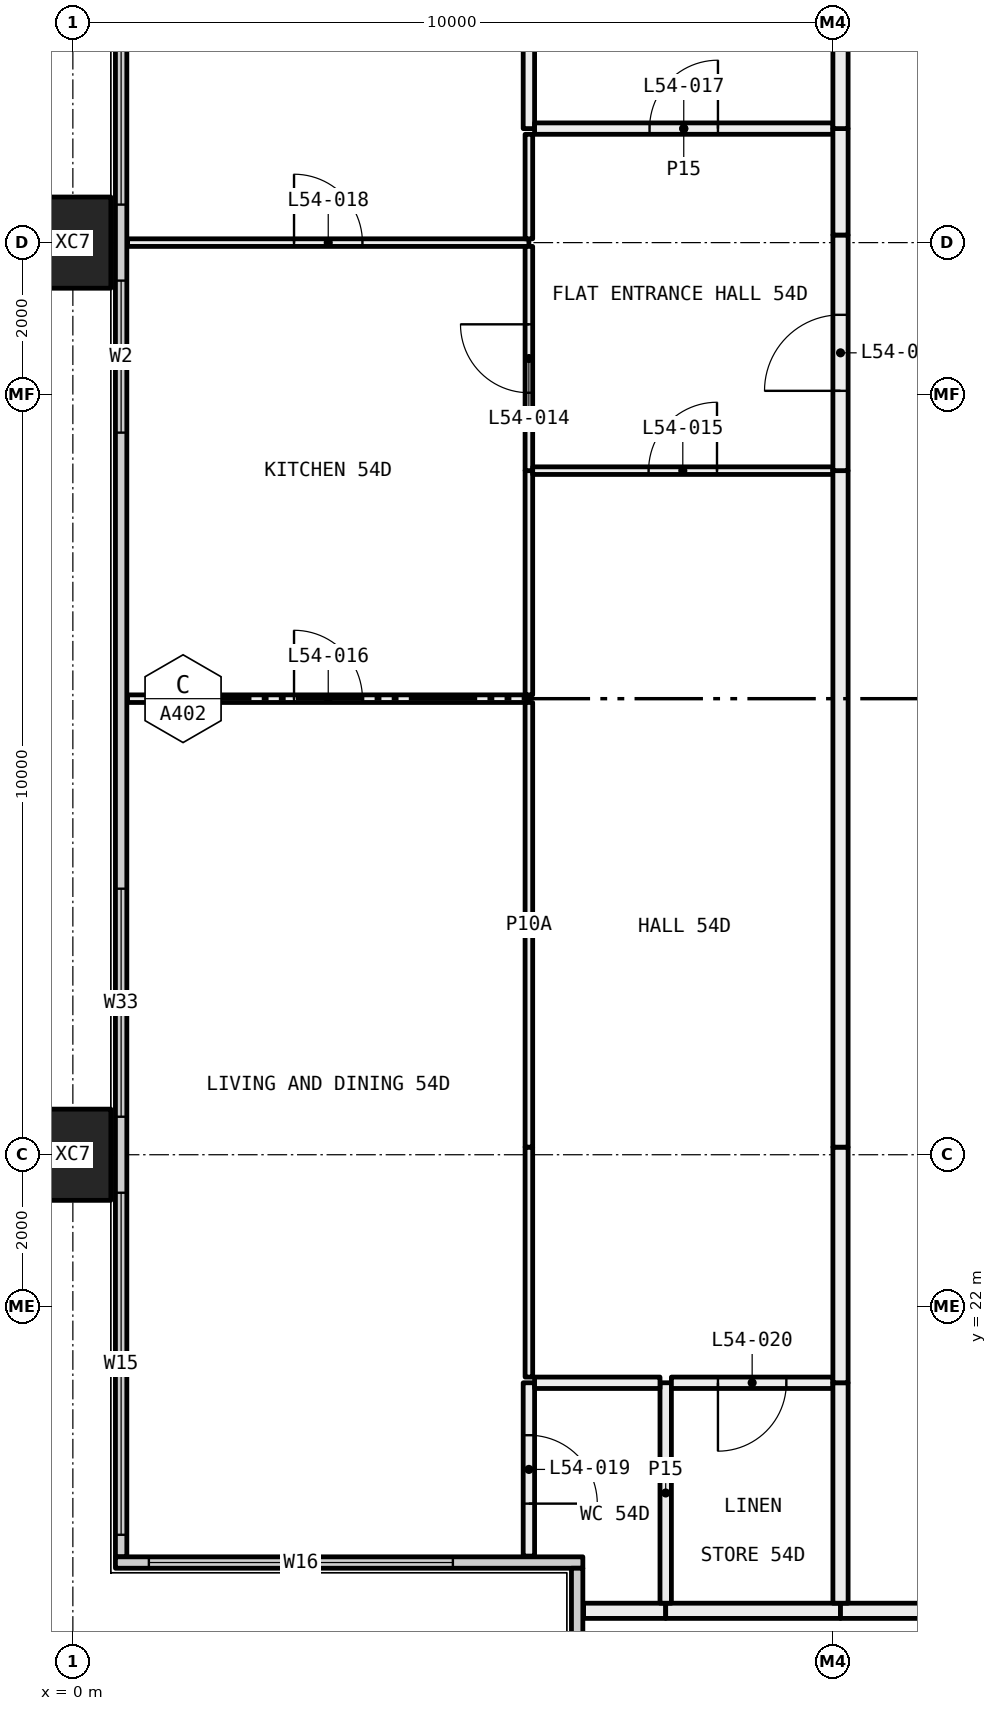
"""IFC4 building model, lengths in metres.
Left out: names, types, materials, properties, quantities, classifications, styles, units other than length and angle.
Written with IfcOpenShell. Run it as: python <this file> out.ifc"""

import sys

from ifc_helpers import new_model, si_unit, direction, frame, frame_2d, origin, origin_2d, place, context, subcontext, project, spatial, rectangle, hollow_rectangle, extrude, element, fill, save


model = new_model("IFC4")
c1 = context("Model", 3, precision=1e-05, world=origin(), true_north=direction((0.0, 1.0)))
c2 = subcontext(c1, "Body", "Model", "MODEL_VIEW")
j1 = project(units=[si_unit("LENGTHUNIT", "METRE"), si_unit("PLANEANGLEUNIT", "RADIAN")], contexts=[c1])
p1 = place(None, origin())
s1 = spatial("IfcSite", under=j1, at=p1, CompositionType="ELEMENT")
p2 = place(p1, origin())
s2 = spatial("IfcBuilding", under=s1, at=p2, CompositionType="ELEMENT")
p3 = place(p2, frame((0.0, 0.0, 203.1)))
s3 = spatial("IfcBuildingStorey", under=s2, at=p3, CompositionType="ELEMENT", Elevation=203.1)
for number, where, z_axis, x_axis in (
    (1, (0.0, 24.0, -0.4), (0.0, 0.0, 1.0), (0.0, 1.0, 0.0)),
    (2, (0.0, 36.0, -0.4), (0.0, 0.0, 1.0), (0.0, 1.0, 0.0)),
):
    element("IfcColumn", number, at=place(p3, frame(where, z_axis=z_axis, x_axis=x_axis)), inside=s3, PredefinedType="COLUMN", context=c2, shape_type="SweptSolid", body=[
        extrude(hollow_rectangle(XDim=1.2, YDim=1.0, WallThickness=0.045, at=origin_2d()), origin(), (0.0, 0.0, 1.0), 3.45),
    ])
p4 = place(p3, frame((0.635, 18.71, 0.0), z_axis=(0.0, 0.0, 1.0), x_axis=(0.0, 1.0, 0.0)))
e3 = element("IfcWall", 3, at=p4, inside=s3, PredefinedType="ELEMENTEDWALL", context=c2, shape_type="SweptSolid", body=[
    extrude(rectangle(XDim=22.58, YDim=0.15, at=frame_2d((11.29, 0.0))), origin(), (0.0, 0.0, 1.0), 3.05),
])
p5 = place(p4, frame((0.29, 0.0, 0.45)))
e4 = element("IfcOpeningElement", 4, at=p5, cuts=e3, PredefinedType="OPENING", context=c2, shape_type="SweptSolid", body=[
    extrude(rectangle(XDim=4.5, YDim=2.55, at=frame_2d((2.25, 1.275))), frame((0.0, 0.085, 0.0), z_axis=(0.0, -1.0, 0.0), x_axis=(1.0, 0.0, 0.0)), (0.0, 0.0, 1.0), 0.17),
])
p6 = place(p4, frame((5.79, 0.0, 0.45)))
e5 = element("IfcOpeningElement", 5, at=p6, cuts=e3, PredefinedType="OPENING", context=c2, shape_type="SweptSolid", body=[
    extrude(rectangle(XDim=3.0, YDim=2.55, at=frame_2d((1.5, 1.275))), frame((0.0, 0.085, 0.0), z_axis=(0.0, -1.0, 0.0), x_axis=(1.0, 0.0, 0.0)), (0.0, 0.0, 1.0), 0.17),
])
p7 = place(p4, frame((14.79, 0.0, 0.45)))
e6 = element("IfcOpeningElement", 6, at=p7, cuts=e3, PredefinedType="OPENING", context=c2, shape_type="SweptSolid", body=[
    extrude(rectangle(XDim=2.0, YDim=2.55, at=frame_2d((1.0, 1.275))), frame((0.0, 0.085, 0.0), z_axis=(0.0, -1.0, 0.0), x_axis=(1.0, 0.0, 0.0)), (0.0, 0.0, 1.0), 0.17),
])
p8 = place(p4, frame((17.79, 0.0, 0.45)))
e7 = element("IfcOpeningElement", 7, at=p8, cuts=e3, PredefinedType="OPENING", context=c2, shape_type="SweptSolid", body=[
    extrude(rectangle(XDim=4.5, YDim=2.55, at=frame_2d((2.25, 1.275))), frame((0.0, 0.085, 0.0), z_axis=(0.0, -1.0, 0.0), x_axis=(1.0, 0.0, 0.0)), (0.0, 0.0, 1.0), 0.17),
])
p9 = place(p3, frame((0.56, 18.635, 0.0), z_axis=(0.0, 0.0, 1.0), x_axis=(1.0, 0.0, 0.0)))
e8 = element("IfcWall", 8, at=p9, inside=s3, PredefinedType="ELEMENTEDWALL", context=c2, shape_type="SweptSolid", body=[
    extrude(rectangle(XDim=6.15, YDim=0.15, at=frame_2d((3.075, 0.0))), origin(), (0.0, 0.0, 1.0), 3.05),
])
p10 = place(p9, frame((0.44, 0.0, 0.45)))
e9 = element("IfcOpeningElement", 9, at=p10, cuts=e8, PredefinedType="OPENING", context=c2, shape_type="SweptSolid", body=[
    extrude(rectangle(XDim=4.0, YDim=2.55, at=frame_2d((2.0, 1.275))), frame((0.0, 0.085, 0.0), z_axis=(0.0, -1.0, 0.0), x_axis=(1.0, 0.0, 0.0)), (0.0, 0.0, 1.0), 0.17),
])
p11 = place(p3, frame((6.635, 12.71, 0.0), z_axis=(0.0, 0.0, 1.0), x_axis=(0.0, 1.0, 0.0)))
e10 = element("IfcWall", 10, at=p11, inside=s3, PredefinedType="ELEMENTEDWALL", context=c2, shape_type="SweptSolid", body=[
    extrude(rectangle(XDim=5.85, YDim=0.15, at=frame_2d((2.925, 0.0))), origin(), (0.0, 0.0, 1.0), 3.05),
])
p12 = place(p11, frame((0.29, 0.0, 0.45)))
e11 = element("IfcOpeningElement", 11, at=p12, cuts=e10, PredefinedType="OPENING", context=c2, shape_type="SweptSolid", body=[
    extrude(rectangle(XDim=4.0, YDim=2.55, at=frame_2d((2.0, 1.275))), frame((0.0, 0.085, 0.0), z_axis=(0.0, -1.0, 0.0), x_axis=(1.0, 0.0, 0.0)), (0.0, 0.0, 1.0), 0.17),
])
p13 = place(p3, frame((7.8, 18.0, 0.0), z_axis=(0.0, 0.0, 1.0), x_axis=(-1.0, 0.0, 0.0)))
e12 = element("IfcWall", 12, at=p13, inside=s3, PredefinedType="PARTITIONING", context=c2, shape_type="SweptSolid", body=[
    extrude(rectangle(XDim=1.08, YDim=0.2, at=frame_2d((0.54, 0.0))), origin(), (0.0, 0.0, 1.0), 3.05),
])
p14 = place(p3, frame((10.1, 18.0, 0.0), z_axis=(0.0, 0.0, 1.0), x_axis=(-1.0, 0.0, 0.0)))
e13 = element("IfcWall", 13, at=p14, inside=s3, PredefinedType="PARTITIONING", context=c2, shape_type="SweptSolid", body=[
    extrude(rectangle(XDim=2.3, YDim=0.2, at=frame_2d((1.15, 0.0))), origin(), (0.0, 0.0, 1.0), 3.05),
])
p15 = place(p3, frame((12.0, 18.0, 0.0), z_axis=(0.0, 0.0, 1.0), x_axis=(-1.0, 0.0, 0.0)))
e14 = element("IfcWall", 14, at=p15, inside=s3, PredefinedType="PARTITIONING", context=c2, shape_type="SweptSolid", body=[
    extrude(rectangle(XDim=1.9, YDim=0.2, at=frame_2d((0.95, 0.0))), origin(), (0.0, 0.0, 1.0), 3.05),
])
p16 = place(p3, frame((6.0, 30.0, 0.0), z_axis=(0.0, 0.0, 1.0), x_axis=(-1.0, 0.0, 0.0)))
e15 = element("IfcWall", 15, at=p16, inside=s3, PredefinedType="PARTITIONING", context=c2, shape_type="SweptSolid", body=[
    extrude(rectangle(XDim=5.28, YDim=0.1, at=frame_2d((2.64, 0.0))), origin(), (0.0, 0.0, 1.0), 3.05),
])
p17 = place(p16, frame((2.19, 0.0, 0.0)))
e16 = element("IfcOpeningElement", 16, at=p17, cuts=e15, PredefinedType="OPENING", context=c2, shape_type="SweptSolid", body=[
    extrude(rectangle(XDim=0.9, YDim=2.1, at=frame_2d((0.45, 1.05))), frame((0.0, 0.06, 0.0), z_axis=(0.0, -1.0, 0.0), x_axis=(1.0, 0.0, 0.0)), (0.0, 0.0, 1.0), 0.12),
])
p18 = place(p3, frame((6.0, 18.72, 0.0), z_axis=(0.0, 0.0, 1.0), x_axis=(0.0, 1.0, 0.0)))
e17 = element("IfcWall", 17, at=p18, inside=s3, PredefinedType="PARTITIONING", context=c2, shape_type="SweptSolid", body=[
    extrude(rectangle(XDim=2.28, YDim=0.15, at=frame_2d((1.14, 0.0))), origin(), (0.0, 0.0, 1.0), 3.05),
])
p19 = place(p18, frame((0.69, 0.0, 0.0)))
e18 = element("IfcOpeningElement", 18, at=p19, cuts=e17, PredefinedType="OPENING", context=c2, shape_type="SweptSolid", body=[
    extrude(rectangle(XDim=0.9, YDim=2.1, at=frame_2d((0.45, 1.05))), frame((0.0, 0.085, 0.0), z_axis=(0.0, -1.0, 0.0), x_axis=(1.0, 0.0, 0.0)), (0.0, 0.0, 1.0), 0.17),
])
p20 = place(p3, frame((6.0, 21.075, 0.0), z_axis=(0.0, 0.0, 1.0), x_axis=(0.0, 1.0, 0.0)))
e19 = element("IfcWall", 19, at=p20, inside=s3, PredefinedType="PARTITIONING", context=c2, shape_type="SweptSolid", body=[
    extrude(rectangle(XDim=3.025, YDim=0.1, at=frame_2d((1.513, 0.0))), origin(), (0.0, 0.0, 1.0), 2.45),
])
p21 = place(p3, frame((6.0, 24.1, 0.0), z_axis=(0.0, 0.0, 1.0), x_axis=(0.0, 1.0, 0.0)))
e20 = element("IfcWall", 20, at=p21, inside=s3, PredefinedType="PARTITIONING", context=c2, shape_type="SweptSolid", body=[
    extrude(rectangle(XDim=5.85, YDim=0.1, at=frame_2d((2.925, 0.0))), origin(), (0.0, 0.0, 1.0), 3.05),
])
p22 = place(p3, frame((6.0, 36.0, 0.0), z_axis=(0.0, 0.0, 1.0), x_axis=(-1.0, 0.0, 0.0)))
e21 = element("IfcWall", 21, at=p22, inside=s3, PredefinedType="PARTITIONING", context=c2, shape_type="SweptSolid", body=[
    extrude(rectangle(XDim=5.28, YDim=0.1, at=frame_2d((2.64, 0.0))), origin(), (0.0, 0.0, 1.0), 2.45),
])
p23 = place(p22, frame((2.19, 0.0, 0.0)))
e22 = element("IfcOpeningElement", 22, at=p23, cuts=e21, PredefinedType="OPENING", context=c2, shape_type="SweptSolid", body=[
    extrude(rectangle(XDim=0.9, YDim=2.1, at=frame_2d((0.45, 1.05))), frame((0.0, 0.06, 0.0), z_axis=(0.0, -1.0, 0.0), x_axis=(1.0, 0.0, 0.0)), (0.0, 0.0, 1.0), 0.12),
])
p24 = place(p3, frame((6.0, 30.05, 0.0), z_axis=(0.0, 0.0, 1.0), x_axis=(0.0, 1.0, 0.0)))
e23 = element("IfcWall", 23, at=p24, inside=s3, PredefinedType="PARTITIONING", context=c2, shape_type="SweptSolid", body=[
    extrude(rectangle(XDim=2.95, YDim=0.1, at=frame_2d((1.475, 0.0))), origin(), (0.0, 0.0, 1.0), 3.05),
])
p25 = place(p3, frame((6.0, 33.0, 0.0), z_axis=(0.0, 0.0, 1.0), x_axis=(0.0, 1.0, 0.0)))
e24 = element("IfcWall", 24, at=p25, inside=s3, PredefinedType="PARTITIONING", context=c2, shape_type="SweptSolid", body=[
    extrude(rectangle(XDim=2.95, YDim=0.1, at=frame_2d((1.475, 0.0))), origin(), (0.0, 0.0, 1.0), 2.45),
])
p26 = place(p25, frame((1.025, 0.0, 0.0)))
e25 = element("IfcOpeningElement", 25, at=p26, cuts=e24, PredefinedType="OPENING", context=c2, shape_type="SweptSolid", body=[
    extrude(rectangle(XDim=0.9, YDim=2.1, at=frame_2d((0.45, 1.05))), frame((0.0, 0.06, 0.0), z_axis=(0.0, -1.0, 0.0), x_axis=(1.0, 0.0, 0.0)), (0.0, 0.0, 1.0), 0.12),
])
p27 = place(p3, frame((6.0, 36.05, 0.0), z_axis=(0.0, 0.0, 1.0), x_axis=(0.0, 1.0, 0.0)))
e26 = element("IfcWall", 26, at=p27, inside=s3, PredefinedType="PARTITIONING", context=c2, shape_type="SweptSolid", body=[
    extrude(rectangle(XDim=1.375, YDim=0.1, at=frame_2d((0.688, 0.0))), origin(), (0.0, 0.0, 1.0), 2.45),
])
p28 = place(p3, frame((6.0, 37.5, 0.0), z_axis=(0.0, 0.0, 1.0), x_axis=(0.0, 1.0, 0.0)))
e27 = element("IfcWall", 27, at=p28, inside=s3, PredefinedType="PARTITIONING", context=c2, shape_type="SweptSolid", body=[
    extrude(rectangle(XDim=3.78, YDim=0.15, at=frame_2d((1.89, 0.0))), origin(), (0.0, 0.0, 1.0), 3.05),
])
p29 = place(p3, frame((7.8, 18.1, 0.0), z_axis=(0.0, 0.0, 1.0), x_axis=(0.0, 1.0, 0.0)))
e28 = element("IfcWall", 28, at=p29, inside=s3, PredefinedType="PARTITIONING", context=c2, shape_type="SweptSolid", body=[
    extrude(rectangle(XDim=2.9, YDim=0.15, at=frame_2d((1.45, 0.0))), origin(), (0.0, 0.0, 1.0), 3.05),
])
p30 = place(p3, frame((7.725, 21.0, 0.0), z_axis=(0.0, 0.0, 1.0), x_axis=(-1.0, 0.0, 0.0)))
e29 = element("IfcWall", 29, at=p30, inside=s3, PredefinedType="PARTITIONING", context=c2, shape_type="SweptSolid", body=[
    extrude(rectangle(XDim=1.65, YDim=0.15, at=frame_2d((0.825, 0.0))), origin(), (0.0, 0.0, 1.0), 3.05),
])
p31 = place(p3, frame((10.0, 21.0, 0.0), z_axis=(0.0, 0.0, 1.0), x_axis=(-1.0, 0.0, 0.0)))
e30 = element("IfcWall", 30, at=p31, inside=s3, PredefinedType="PARTITIONING", context=c2, shape_type="SweptSolid", body=[
    extrude(rectangle(XDim=2.125, YDim=0.15, at=frame_2d((1.062, 0.0))), origin(), (0.0, 0.0, 1.0), 3.05),
])
p32 = place(p31, frame((0.613, 0.0, 0.0)))
e31 = element("IfcOpeningElement", 31, at=p32, cuts=e30, PredefinedType="OPENING", context=c2, shape_type="SweptSolid", body=[
    extrude(rectangle(XDim=0.9, YDim=2.1, at=frame_2d((0.45, 1.05))), frame((0.0, 0.085, 0.0), z_axis=(0.0, -1.0, 0.0), x_axis=(1.0, 0.0, 0.0)), (0.0, 0.0, 1.0), 0.17),
])
p33 = place(p3, frame((10.1, 18.1, 0.0), z_axis=(0.0, 0.0, 1.0), x_axis=(0.0, 1.0, 0.0)))
e32 = element("IfcWall", 32, at=p33, inside=s3, PredefinedType="PARTITIONING", context=c2, shape_type="SweptSolid", body=[
    extrude(rectangle(XDim=2.9, YDim=0.2, at=frame_2d((1.45, 0.0))), origin(), (0.0, 0.0, 1.0), 3.05),
])
p34 = place(p3, frame((10.0, 33.0, 0.0), z_axis=(0.0, 0.0, 1.0), x_axis=(-1.0, 0.0, 0.0)))
e33 = element("IfcWall", 33, at=p34, inside=s3, PredefinedType="PARTITIONING", context=c2, shape_type="SweptSolid", body=[
    extrude(rectangle(XDim=3.95, YDim=0.1, at=frame_2d((1.975, 0.0))), origin(), (0.0, 0.0, 1.0), 3.05),
])
p35 = place(p34, frame((1.525, 0.0, 0.0)))
e34 = element("IfcOpeningElement", 34, at=p35, cuts=e33, PredefinedType="OPENING", context=c2, shape_type="SweptSolid", body=[
    extrude(rectangle(XDim=0.9, YDim=2.1, at=frame_2d((0.45, 1.05))), frame((0.0, 0.06, 0.0), z_axis=(0.0, -1.0, 0.0), x_axis=(1.0, 0.0, 0.0)), (0.0, 0.0, 1.0), 0.12),
])
p36 = place(p3, frame((10.1, 21.0, 0.0), z_axis=(0.0, 0.0, 1.0), x_axis=(0.0, 1.0, 0.0)))
e35 = element("IfcWall", 35, at=p36, inside=s3, PredefinedType="PARTITIONING", context=c2, shape_type="SweptSolid", body=[
    extrude(rectangle(XDim=3.1, YDim=0.2, at=frame_2d((1.55, 0.0))), origin(), (0.0, 0.0, 1.0), 2.45),
])
p37 = place(p3, frame((10.1, 24.1, 0.0), z_axis=(0.0, 0.0, 1.0), x_axis=(0.0, 1.0, 0.0)))
e36 = element("IfcWall", 36, at=p37, inside=s3, PredefinedType="PARTITIONING", context=c2, shape_type="SweptSolid", body=[
    extrude(rectangle(XDim=8.9, YDim=0.2, at=frame_2d((4.45, 0.0))), origin(), (0.0, 0.0, 1.0), 3.05),
])
p38 = place(p3, frame((10.0, 37.5, 0.0), z_axis=(0.0, 0.0, 1.0), x_axis=(-1.0, 0.0, 0.0)))
e37 = element("IfcWall", 37, at=p38, inside=s3, PredefinedType="PARTITIONING", context=c2, shape_type="SweptSolid", body=[
    extrude(rectangle(XDim=3.925, YDim=0.15, at=frame_2d((1.962, 0.0))), origin(), (0.0, 0.0, 1.0), 3.05),
])
p39 = place(p38, frame((1.512, 0.0, 0.0)))
e38 = element("IfcOpeningElement", 38, at=p39, cuts=e37, PredefinedType="OPENING", context=c2, shape_type="SweptSolid", body=[
    extrude(rectangle(XDim=0.9, YDim=2.1, at=frame_2d((0.45, 1.05))), frame((0.0, 0.085, 0.0), z_axis=(0.0, -1.0, 0.0), x_axis=(1.0, 0.0, 0.0)), (0.0, 0.0, 1.0), 0.17),
])
p40 = place(p3, frame((10.1, 33.0, 0.0), z_axis=(0.0, 0.0, 1.0), x_axis=(0.0, 1.0, 0.0)))
e39 = element("IfcWall", 39, at=p40, inside=s3, PredefinedType="PARTITIONING", context=c2, shape_type="SweptSolid", body=[
    extrude(rectangle(XDim=3.1, YDim=0.2, at=frame_2d((1.55, 0.0))), origin(), (0.0, 0.0, 1.0), 2.45),
])
p41 = place(p40, frame((1.05, 0.0, 0.0)))
e40 = element("IfcOpeningElement", 40, at=p41, cuts=e39, PredefinedType="OPENING", context=c2, shape_type="SweptSolid", body=[
    extrude(rectangle(XDim=1.0, YDim=2.1, at=frame_2d((0.5, 1.05))), frame((0.0, 0.11, 0.0), z_axis=(0.0, -1.0, 0.0), x_axis=(1.0, 0.0, 0.0)), (0.0, 0.0, 1.0), 0.22),
])
p42 = place(p3, frame((10.1, 36.1, 0.0), z_axis=(0.0, 0.0, 1.0), x_axis=(0.0, 1.0, 0.0)))
e41 = element("IfcWall", 41, at=p42, inside=s3, PredefinedType="PARTITIONING", context=c2, shape_type="SweptSolid", body=[
    extrude(rectangle(XDim=1.4, YDim=0.2, at=frame_2d((0.7, 0.0))), origin(), (0.0, 0.0, 1.0), 3.05),
])
p43 = place(p3, frame((10.1, 37.5, 0.0), z_axis=(0.0, 0.0, 1.0), x_axis=(0.0, 1.0, 0.0)))
e42 = element("IfcWall", 42, at=p43, inside=s3, PredefinedType="PARTITIONING", context=c2, shape_type="SweptSolid", body=[
    extrude(rectangle(XDim=4.4, YDim=0.2, at=frame_2d((2.2, 0.0))), origin(), (0.0, 0.0, 1.0), 3.05),
])
p44 = place(p5, origin())
e43 = element("IfcWindow", 43, at=p44, inside=s3, PartitioningType="SINGLE_PANEL", PredefinedType="WINDOW", context=c2, shape_type="SweptSolid", body=[
    extrude(rectangle(XDim=4.5, YDim=2.55, at=frame_2d((2.25, 1.275))), frame((0.0, 0.03, 0.0), z_axis=(0.0, -1.0, 0.0), x_axis=(1.0, 0.0, 0.0)), (0.0, 0.0, 1.0), 0.06),
])
fill(e4, e43)
p45 = place(p6, origin())
e44 = element("IfcWindow", 44, at=p45, inside=s3, PartitioningType="SINGLE_PANEL", PredefinedType="WINDOW", context=c2, shape_type="SweptSolid", body=[
    extrude(rectangle(XDim=3.0, YDim=2.55, at=frame_2d((1.5, 1.275))), frame((0.0, 0.03, 0.0), z_axis=(0.0, -1.0, 0.0), x_axis=(1.0, 0.0, 0.0)), (0.0, 0.0, 1.0), 0.06),
])
fill(e5, e44)
p46 = place(p7, origin())
e45 = element("IfcWindow", 45, at=p46, inside=s3, PartitioningType="SINGLE_PANEL", PredefinedType="WINDOW", context=c2, shape_type="SweptSolid", body=[
    extrude(rectangle(XDim=2.0, YDim=2.55, at=frame_2d((1.0, 1.275))), frame((0.0, 0.03, 0.0), z_axis=(0.0, -1.0, 0.0), x_axis=(1.0, 0.0, 0.0)), (0.0, 0.0, 1.0), 0.06),
])
fill(e6, e45)
p47 = place(p8, origin())
e46 = element("IfcWindow", 46, at=p47, inside=s3, PartitioningType="SINGLE_PANEL", PredefinedType="WINDOW", context=c2, shape_type="SweptSolid", body=[
    extrude(rectangle(XDim=4.5, YDim=2.55, at=frame_2d((2.25, 1.275))), frame((0.0, 0.03, 0.0), z_axis=(0.0, -1.0, 0.0), x_axis=(1.0, 0.0, 0.0)), (0.0, 0.0, 1.0), 0.06),
])
fill(e7, e46)
p48 = place(p10, origin())
e47 = element("IfcWindow", 47, at=p48, inside=s3, PartitioningType="SINGLE_PANEL", PredefinedType="WINDOW", context=c2, shape_type="SweptSolid", body=[
    extrude(rectangle(XDim=4.0, YDim=2.55, at=frame_2d((2.0, 1.275))), frame((0.0, 0.03, 0.0), z_axis=(0.0, -1.0, 0.0), x_axis=(1.0, 0.0, 0.0)), (0.0, 0.0, 1.0), 0.06),
])
fill(e9, e47)
p49 = place(p41, origin())
e48 = element("IfcDoor", 48, at=p49, inside=s3, OperationType="SINGLE_SWING_RIGHT", PredefinedType="DOOR", context=c2, shape_type="SweptSolid", body=[
    extrude(rectangle(XDim=1.0, YDim=2.1, at=frame_2d((0.5, 1.05))), frame((0.0, 0.025, 0.0), z_axis=(0.0, -1.0, 0.0), x_axis=(1.0, 0.0, 0.0)), (0.0, 0.0, 1.0), 0.05),
])
fill(e40, e48)
p50 = place(p26, origin())
e49 = element("IfcDoor", 49, at=p50, inside=s3, OperationType="SINGLE_SWING_LEFT", PredefinedType="DOOR", context=c2, shape_type="SweptSolid", body=[
    extrude(rectangle(XDim=0.9, YDim=2.1, at=frame_2d((0.45, 1.05))), frame((0.0, 0.025, 0.0), z_axis=(0.0, -1.0, 0.0), x_axis=(1.0, 0.0, 0.0)), (0.0, 0.0, 1.0), 0.05),
])
fill(e25, e49)
p51 = place(p35, frame((0.9, 0.0, 0.0), x_axis=(-1.0, 0.0, 0.0)))
e50 = element("IfcDoor", 50, at=p51, inside=s3, OperationType="SINGLE_SWING_LEFT", PredefinedType="DOOR", context=c2, shape_type="SweptSolid", body=[
    extrude(rectangle(XDim=0.9, YDim=2.1, at=frame_2d((0.45, 1.05))), frame((0.0, 0.025, 0.0), z_axis=(0.0, -1.0, 0.0), x_axis=(1.0, 0.0, 0.0)), (0.0, 0.0, 1.0), 0.05),
])
fill(e34, e50)
p52 = place(p17, frame((0.9, 0.0, 0.0), x_axis=(-1.0, 0.0, 0.0)))
e51 = element("IfcDoor", 51, at=p52, inside=s3, OperationType="SINGLE_SWING_RIGHT", PredefinedType="DOOR", context=c2, shape_type="SweptSolid", body=[
    extrude(rectangle(XDim=0.9, YDim=2.1, at=frame_2d((0.45, 1.05))), frame((0.0, 0.025, 0.0), z_axis=(0.0, -1.0, 0.0), x_axis=(1.0, 0.0, 0.0)), (0.0, 0.0, 1.0), 0.05),
])
fill(e16, e51)
p53 = place(p39, frame((0.9, 0.0, 0.0), x_axis=(-1.0, 0.0, 0.0)))
e52 = element("IfcDoor", 52, at=p53, inside=s3, OperationType="SINGLE_SWING_LEFT", PredefinedType="DOOR", context=c2, shape_type="SweptSolid", body=[
    extrude(rectangle(XDim=0.9, YDim=2.1, at=frame_2d((0.45, 1.05))), frame((0.0, 0.025, 0.0), z_axis=(0.0, -1.0, 0.0), x_axis=(1.0, 0.0, 0.0)), (0.0, 0.0, 1.0), 0.05),
])
fill(e38, e52)
p54 = place(p23, frame((0.9, 0.0, 0.0), x_axis=(-1.0, 0.0, 0.0)))
e53 = element("IfcDoor", 53, at=p54, inside=s3, OperationType="SINGLE_SWING_RIGHT", PredefinedType="DOOR", context=c2, shape_type="SweptSolid", body=[
    extrude(rectangle(XDim=0.9, YDim=2.1, at=frame_2d((0.45, 1.05))), frame((0.0, 0.025, 0.0), z_axis=(0.0, -1.0, 0.0), x_axis=(1.0, 0.0, 0.0)), (0.0, 0.0, 1.0), 0.05),
])
fill(e22, e53)
p55 = place(p19, frame((0.9, 0.0, 0.0), x_axis=(-1.0, 0.0, 0.0)))
e54 = element("IfcDoor", 54, at=p55, inside=s3, OperationType="SINGLE_SWING_LEFT", PredefinedType="DOOR", context=c2, shape_type="SweptSolid", body=[
    extrude(rectangle(XDim=0.9, YDim=2.1, at=frame_2d((0.45, 1.05))), frame((0.0, 0.025, 0.0), z_axis=(0.0, -1.0, 0.0), x_axis=(1.0, 0.0, 0.0)), (0.0, 0.0, 1.0), 0.05),
])
fill(e18, e54)
p56 = place(p32, origin())
e55 = element("IfcDoor", 55, at=p56, inside=s3, OperationType="SINGLE_SWING_LEFT", PredefinedType="DOOR", context=c2, shape_type="SweptSolid", body=[
    extrude(rectangle(XDim=0.9, YDim=2.1, at=frame_2d((0.45, 1.05))), frame((0.0, 0.025, 0.0), z_axis=(0.0, -1.0, 0.0), x_axis=(1.0, 0.0, 0.0)), (0.0, 0.0, 1.0), 0.05),
])
fill(e31, e55)
save(model, sys.argv[1])
